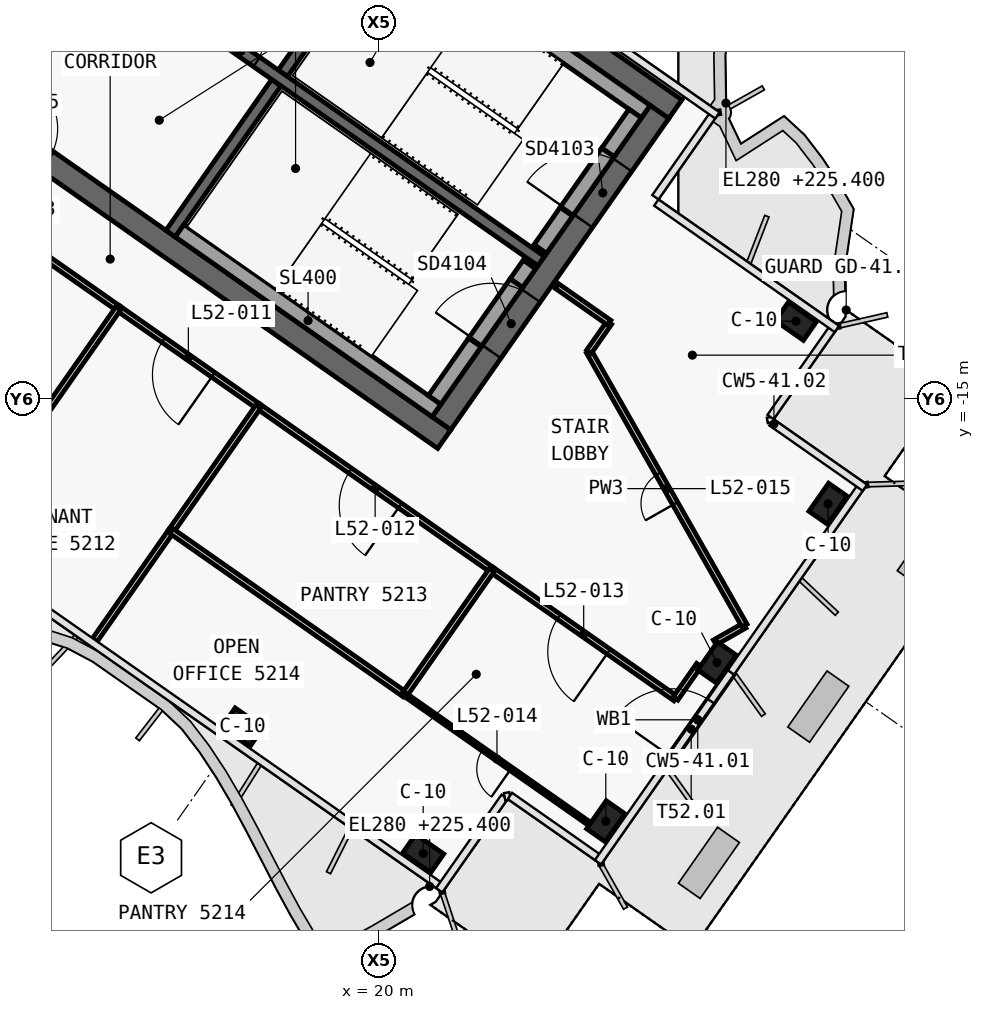
"""IFC4 building model, lengths in metres.
Left out: names, types, materials, properties, quantities, classifications, styles, units other than length and angle.
Written with IfcOpenShell. Run it as: python <this file> out.ifc"""

import sys

from ifc_helpers import new_model, si_unit, direction, frame, frame_2d, origin, origin_2d, place, context, subcontext, project, spatial, polyline, rectangle, outline, extrude, element, fill, save


model = new_model("IFC4")
c1 = context("Model", 3, precision=1e-05, world=origin(), true_north=direction((0.0, 1.0)))
c2 = subcontext(c1, "Body", "Model", "MODEL_VIEW")
j1 = project(units=[si_unit("LENGTHUNIT", "METRE"), si_unit("PLANEANGLEUNIT", "RADIAN")], contexts=[c1])
p1 = place(None, origin())
s1 = spatial("IfcSite", under=j1, at=p1, CompositionType="ELEMENT")
p2 = place(p1, origin())
s2 = spatial("IfcBuilding", under=s1, at=p2, CompositionType="ELEMENT")
p3 = place(p2, frame((0.0, 0.0, 225.4)))
s3 = spatial("IfcBuildingStorey", under=s2, at=p3, CompositionType="ELEMENT", Elevation=225.4)
p4 = place(p3, frame((0.028, 12.066, 0.0), z_axis=(0.0, 0.0, 1.0), x_axis=(0.819151382952, -0.573577380837, 0.0)))
e1 = element("IfcWall", 1, at=p4, inside=s3, PredefinedType="SHEAR", context=c2, shape_type="SweptSolid", body=[
    extrude(outline(polyline([(33.898, 0.3), (0.0, 0.3), (0.42, -0.3), (33.898, -0.3), (33.898, 0.3)])), origin(), (0.0, 0.0, 1.0), 3.9),
])
p5 = place(p3, frame((0.028, -0.874, 0.0), z_axis=(0.0, 0.0, 1.0), x_axis=(0.819150035022, -0.573579305871, 0.0)))
e2 = element("IfcWall", 2, at=p5, inside=s3, PredefinedType="SHEAR", context=c2, shape_type="SweptSolid", body=[
    extrude(outline(polyline([(26.476, 0.3), (0.0, 0.3), (0.42, -0.3), (26.476, -0.3), (26.476, 0.3)])), origin(), (0.0, 0.0, 1.0), 3.9),
])
p6 = place(p5, frame((6.576, 0.0, 0.0)))
e3 = element("IfcOpeningElement", 3, at=p6, cuts=e2, PredefinedType="OPENING", context=c2, shape_type="SweptSolid", body=[
    extrude(rectangle(XDim=1.5, YDim=2.1, at=frame_2d((0.75, 1.05))), frame((0.0, 0.31, 0.0), z_axis=(0.0, -1.0, 0.0), x_axis=(1.0, 0.0, 0.0)), (0.0, 0.0, 1.0), 0.62),
])
p7 = place(p5, frame((12.226, 0.0, 0.0)))
e4 = element("IfcOpeningElement", 4, at=p7, cuts=e2, PredefinedType="OPENING", context=c2, shape_type="SweptSolid", body=[
    extrude(rectangle(XDim=1.5, YDim=2.1, at=frame_2d((0.75, 1.05))), frame((0.0, 0.31, 0.0), z_axis=(0.0, -1.0, 0.0), x_axis=(1.0, 0.0, 0.0)), (0.0, 0.0, 1.0), 0.62),
])
p8 = place(p3, frame((21.642, -15.642, 0.0), z_axis=(0.0, 0.0, 1.0), x_axis=(0.573586866468, 0.819144740944, 0.0)))
e5 = element("IfcWall", 5, at=p8, inside=s3, PredefinedType="SHEAR", context=c2, shape_type="SweptSolid", body=[
    extrude(outline(polyline([(10.0, 0.3), (0.0, 0.3), (0.0, -0.3), (10.0, -0.3), (10.0, 0.3)])), origin(), (0.0, 0.0, 1.0), 3.9),
])
p9 = place(p8, frame((6.5, 0.0, 0.0)))
e6 = element("IfcOpeningElement", 6, at=p9, cuts=e5, PredefinedType="OPENING", context=c2, shape_type="SweptSolid", body=[
    extrude(rectangle(XDim=1.8, YDim=2.1, at=frame_2d((0.9, 1.05))), frame((0.0, 0.31, 0.0), z_axis=(0.0, -1.0, 0.0), x_axis=(1.0, 0.0, 0.0)), (0.0, 0.0, 1.0), 0.62),
])
p10 = place(p8, frame((2.3, 0.0, 0.0)))
e7 = element("IfcOpeningElement", 7, at=p10, cuts=e5, PredefinedType="OPENING", context=c2, shape_type="SweptSolid", body=[
    extrude(rectangle(XDim=1.8, YDim=2.1, at=frame_2d((0.9, 1.05))), frame((0.0, 0.31, 0.0), z_axis=(0.0, -1.0, 0.0), x_axis=(1.0, 0.0, 0.0)), (0.0, 0.0, 1.0), 0.62),
])
p11 = place(p3, frame((14.515, -10.652, 0.0), z_axis=(0.0, 0.0, 1.0), x_axis=(0.573560315113, 0.819163332265, 0.0)))
e8 = element("IfcWall", 8, at=p11, inside=s3, PredefinedType="SHEAR", context=c2, shape_type="SweptSolid", body=[
    extrude(outline(polyline([(0.0, 0.15), (0.0, -0.15), (4.85, -0.15), (4.85, 0.15), (0.0, 0.15)])), origin(), (0.0, 0.0, 1.0), 3.9),
])
p12 = place(p3, frame((17.469, -6.433, 0.0), z_axis=(0.0, 0.0, 1.0), x_axis=(0.573594092424, 0.81913968109, 0.0)))
e9 = element("IfcWall", 9, at=p12, inside=s3, PredefinedType="SHEAR", context=c2, shape_type="SweptSolid", body=[
    extrude(outline(polyline([(4.85, -0.15), (4.85, 0.15), (0.0, 0.15), (0.0, -0.15), (4.85, -0.15)])), origin(), (0.0, 0.0, 1.0), 3.9),
])
p13 = place(p3, frame((2.638, 3.768, 0.0), z_axis=(0.0, 0.0, 1.0), x_axis=(0.819155014212, -0.573572194837, 0.0)))
e10 = element("IfcWall", 10, at=p13, inside=s3, PredefinedType="SHEAR", context=c2, shape_type="SweptSolid", body=[
    extrude(outline(polyline([(0.0, 0.15), (0.0, -0.15), (26.4, -0.15), (26.4, 0.15), (0.0, 0.15)])), origin(), (0.0, 0.0, 1.0), 3.9),
])
p14 = place(p13, frame((9.637, 0.0, 0.0)))
e11 = element("IfcOpeningElement", 11, at=p14, cuts=e10, PredefinedType="OPENING", context=c2, shape_type="SweptSolid", body=[
    extrude(rectangle(XDim=1.2, YDim=2.1, at=frame_2d((0.6, 1.05))), frame((0.0, 0.16, 0.0), z_axis=(0.0, -1.0, 0.0), x_axis=(1.0, 0.0, 0.0)), (0.0, 0.0, 1.0), 0.32),
])
p15 = place(p13, frame((11.812, 0.0, 0.0)))
e12 = element("IfcOpeningElement", 12, at=p15, cuts=e10, PredefinedType="OPENING", context=c2, shape_type="SweptSolid", body=[
    extrude(rectangle(XDim=1.2, YDim=2.1, at=frame_2d((0.6, 1.05))), frame((0.0, 0.16, 0.0), z_axis=(0.0, -1.0, 0.0), x_axis=(1.0, 0.0, 0.0)), (0.0, 0.0, 1.0), 0.32),
])
p16 = place(p13, frame((13.988, 0.0, 0.0)))
e13 = element("IfcOpeningElement", 13, at=p16, cuts=e10, PredefinedType="OPENING", context=c2, shape_type="SweptSolid", body=[
    extrude(rectangle(XDim=1.2, YDim=2.1, at=frame_2d((0.6, 1.05))), frame((0.0, 0.16, 0.0), z_axis=(0.0, -1.0, 0.0), x_axis=(1.0, 0.0, 0.0)), (0.0, 0.0, 1.0), 0.32),
])
p17 = place(p13, frame((16.262, 0.0, 0.0)))
e14 = element("IfcOpeningElement", 14, at=p17, cuts=e10, PredefinedType="OPENING", context=c2, shape_type="SweptSolid", body=[
    extrude(rectangle(XDim=1.0, YDim=2.1, at=frame_2d((0.5, 1.05))), frame((0.0, 0.16, 0.0), z_axis=(0.0, -1.0, 0.0), x_axis=(1.0, 0.0, 0.0)), (0.0, 0.0, 1.0), 0.32),
])
for number, where, z_axis, x_axis in (
    (15, (16.41, -23.637, 0.0), (0.0, 0.0, 1.0), (0.819, -0.574, 0.0)),
    (16, (21.161, -26.964, 0.0), (0.0, 0.0, 1.0), (0.819, -0.574, 0.0)),
    (17, (30.969, -12.956, 0.0), (0.0, 0.0, 1.0), (0.819, -0.574, 0.0)),
    (18, (25.966, -26.117, 0.0), (0.0, 0.0, 1.0), (0.574, 0.819, 0.0)),
    (19, (28.891, -21.939, 0.0), (0.0, 0.0, 1.0), (0.574, 0.819, 0.0)),
    (20, (31.816, -17.761, 0.0), (0.0, 0.0, 1.0), (0.574, 0.819, 0.0)),
):
    element("IfcColumn", number, at=place(p3, frame(where, z_axis=z_axis, x_axis=x_axis)), inside=s3, PredefinedType="COLUMN", context=c2, shape_type="SweptSolid", body=[
        extrude(rectangle(XDim=0.9, YDim=0.6, at=origin_2d()), origin(), (0.0, 0.0, 1.0), 3.9),
    ])
p18 = place(p3, frame((20.259, -2.71, 0.0), z_axis=(0.0, 0.0, 1.0), x_axis=(0.81914849389, -0.573581506813, 0.0)))
e21 = element("IfcWall", 21, at=p18, inside=s3, PredefinedType="SOLIDWALL", context=c2, shape_type="SweptSolid", body=[
    extrude(rectangle(XDim=8.25, YDim=0.4, at=frame_2d((4.125, 0.0))), origin(), (0.0, 0.0, 1.0), 3.62),
])
p19 = place(p3, frame((24.244, -11.055, 0.0), z_axis=(0.0, 0.0, 1.0), x_axis=(0.573571582932, 0.819155442668, 0.0)))
e22 = element("IfcWall", 22, at=p19, inside=s3, PredefinedType="SOLIDWALL", context=c2, shape_type="SweptSolid", body=[
    extrude(rectangle(XDim=1.2, YDim=0.4, at=frame_2d((0.6, 0.0))), origin(), (0.0, 0.0, 1.0), 3.62),
])
p20 = place(p3, frame((26.022, -8.515, 0.0), z_axis=(0.0, 0.0, 1.0), x_axis=(0.573619628835, 0.819121798889, 0.0)))
e23 = element("IfcWall", 23, at=p20, inside=s3, PredefinedType="SOLIDWALL", context=c2, shape_type="SweptSolid", body=[
    extrude(rectangle(XDim=1.25, YDim=0.4, at=frame_2d((0.625, 0.0))), origin(), (0.0, 0.0, 1.0), 3.62),
])
p21 = place(p3, frame((24.932, -10.072, 2.15), z_axis=(0.0, 0.0, 1.0), x_axis=(0.573591692345, 0.819141361715, 0.0)))
e24 = element("IfcWall", 24, at=p21, inside=s3, PredefinedType="SOLIDWALL", context=c2, shape_type="SweptSolid", body=[
    extrude(rectangle(XDim=1.9, YDim=0.4, at=frame_2d((0.95, 0.0))), origin(), (0.0, 0.0, 1.0), 1.47),
])
p22 = place(p3, frame((14.753, -10.574, 0.0), z_axis=(0.0, 0.0, 1.0), x_axis=(0.819158229677, -0.573567602601, 0.0)))
e25 = element("IfcWall", 25, at=p22, inside=s3, PredefinedType="SOLIDWALL", context=c2, shape_type="SweptSolid", body=[
    extrude(rectangle(XDim=8.25, YDim=0.4, at=frame_2d((4.125, 0.0))), origin(), (0.0, 0.0, 1.0), 3.62),
])
p23 = place(p3, frame((21.462, -15.028, 0.0), z_axis=(0.0, 0.0, 1.0), x_axis=(0.573559770908, 0.819163713305, 0.0)))
e26 = element("IfcWall", 26, at=p23, inside=s3, PredefinedType="SOLIDWALL", context=c2, shape_type="SweptSolid", body=[
    extrude(rectangle(XDim=1.85, YDim=0.4, at=frame_2d((0.925, 0.0))), origin(), (0.0, 0.0, 1.0), 3.62),
])
p24 = place(p3, frame((23.613, -11.956, 0.0), z_axis=(0.0, 0.0, 1.0), x_axis=(0.573435029941, 0.819251039936, 0.0)))
e27 = element("IfcWall", 27, at=p24, inside=s3, PredefinedType="SOLIDWALL", context=c2, shape_type="SweptSolid", body=[
    extrude(rectangle(XDim=0.6, YDim=0.4, at=frame_2d((0.3, 0.0))), origin(), (0.0, 0.0, 1.0), 3.62),
])
p25 = place(p3, frame((22.523, -13.512, 2.15), z_axis=(0.0, 0.0, 1.0), x_axis=(0.573591692345, 0.819141361715, 0.0)))
e28 = element("IfcWall", 28, at=p25, inside=s3, PredefinedType="SOLIDWALL", context=c2, shape_type="SweptSolid", body=[
    extrude(rectangle(XDim=1.9, YDim=0.4, at=frame_2d((0.95, 0.0))), origin(), (0.0, 0.0, 1.0), 1.47),
])
p26 = place(p3, frame((27.528, -24.671, 0.0), z_axis=(0.0, 0.0, 1.0), x_axis=(0.57360481557, 0.819132172213, 0.0)))
e29 = element("IfcWall", 29, at=p26, inside=s3, PredefinedType="SOLIDWALL", context=c2, shape_type="SweptSolid", body=[
    extrude(rectangle(XDim=2.99, YDim=0.2, at=frame_2d((1.495, 0.0))), origin(), (0.0, 0.0, 1.0), 3.62),
])
p27 = place(p26, frame((0.295, 0.0, 0.0)))
e30 = element("IfcOpeningElement", 30, at=p27, cuts=e29, PredefinedType="OPENING", context=c2, shape_type="SweptSolid", body=[
    extrude(rectangle(XDim=1.8, YDim=2.4, at=frame_2d((0.9, 1.2))), frame((0.0, 0.11, 0.0), z_axis=(0.0, -1.0, 0.0), x_axis=(1.0, 0.0, 0.0)), (0.0, 0.0, 1.0), 0.22),
])
p28 = place(p3, frame((13.14, -12.619, 0.0), z_axis=(0.0, 0.0, 1.0), x_axis=(-0.81915291695, 0.57357519006, 0.0)))
e31 = element("IfcWall", 31, at=p28, inside=s3, PredefinedType="PARTITIONING", context=c2, shape_type="SweptSolid", body=[
    extrude(rectangle(XDim=9.002, YDim=0.15, at=frame_2d((4.501, 0.0))), origin(), (0.0, 0.0, 1.0), 3.05),
])
p29 = place(p28, frame((3.701, 0.0, 0.0)))
e32 = element("IfcOpeningElement", 32, at=p29, cuts=e31, PredefinedType="OPENING", context=c2, shape_type="SweptSolid", body=[
    extrude(rectangle(XDim=1.6, YDim=2.1, at=frame_2d((0.8, 1.05))), frame((0.0, 0.085, 0.0), z_axis=(0.0, -1.0, 0.0), x_axis=(1.0, 0.0, 0.0)), (0.0, 0.0, 1.0), 0.17),
])
p30 = place(p3, frame((16.826, -15.2, 0.0), z_axis=(0.0, 0.0, 1.0), x_axis=(-0.819147870025, 0.573582397772, 0.0)))
e33 = element("IfcWall", 33, at=p30, inside=s3, PredefinedType="PARTITIONING", context=c2, shape_type="SweptSolid", body=[
    extrude(rectangle(XDim=4.504, YDim=0.15, at=frame_2d((2.252, 0.0))), origin(), (0.0, 0.0, 1.0), 3.05),
])
p31 = place(p30, frame((1.452, 0.0, 0.0)))
e34 = element("IfcOpeningElement", 34, at=p31, cuts=e33, PredefinedType="OPENING", context=c2, shape_type="SweptSolid", body=[
    extrude(rectangle(XDim=1.6, YDim=2.1, at=frame_2d((0.8, 1.05))), frame((0.0, 0.085, 0.0), z_axis=(0.0, -1.0, 0.0), x_axis=(1.0, 0.0, 0.0)), (0.0, 0.0, 1.0), 0.17),
])
p32 = place(p3, frame((22.97, -19.502, 0.0), z_axis=(0.0, 0.0, 1.0), x_axis=(-0.819149375276, 0.573580248078, 0.0)))
e35 = element("IfcWall", 35, at=p32, inside=s3, PredefinedType="PARTITIONING", context=c2, shape_type="SweptSolid", body=[
    extrude(rectangle(XDim=7.504, YDim=0.15, at=frame_2d((3.752, 0.0))), origin(), (0.0, 0.0, 1.0), 3.05),
])
p33 = place(p32, frame((2.952, 0.0, 0.0)))
e36 = element("IfcOpeningElement", 36, at=p33, cuts=e35, PredefinedType="OPENING", context=c2, shape_type="SweptSolid", body=[
    extrude(rectangle(XDim=1.6, YDim=2.1, at=frame_2d((0.8, 1.05))), frame((0.0, 0.085, 0.0), z_axis=(0.0, -1.0, 0.0), x_axis=(1.0, 0.0, 0.0)), (0.0, 0.0, 1.0), 0.17),
])
p34 = place(p3, frame((27.802, -22.885, 0.0), z_axis=(0.0, 0.0, 1.0), x_axis=(-0.819156123335, 0.573570610825, 0.0)))
e37 = element("IfcWall", 37, at=p34, inside=s3, PredefinedType="PARTITIONING", context=c2, shape_type="SweptSolid", body=[
    extrude(rectangle(XDim=5.902, YDim=0.15, at=frame_2d((2.951, 0.0))), origin(), (0.0, 0.0, 1.0), 3.05),
])
p35 = place(p34, frame((2.151, 0.0, 0.0)))
e38 = element("IfcOpeningElement", 38, at=p35, cuts=e37, PredefinedType="OPENING", context=c2, shape_type="SweptSolid", body=[
    extrude(rectangle(XDim=1.6, YDim=2.1, at=frame_2d((0.8, 1.05))), frame((0.0, 0.085, 0.0), z_axis=(0.0, -1.0, 0.0), x_axis=(1.0, 0.0, 0.0)), (0.0, 0.0, 1.0), 0.17),
])
p36 = place(p3, frame((28.418, -22.004, 0.0), z_axis=(0.0, 0.0, 1.0), x_axis=(-0.573629982879, -0.819114547998, 0.0)))
e39 = element("IfcWall", 39, at=p36, inside=s3, PredefinedType="PARTITIONING", context=c2, shape_type="SweptSolid", body=[
    extrude(rectangle(XDim=1.075, YDim=0.15, at=frame_2d((0.538, 0.0))), origin(), (0.0, 0.0, 1.0), 3.62),
])
p37 = place(p3, frame((28.834, -21.411, 0.0), z_axis=(0.0, 0.0, 1.0), x_axis=(0.869525386045, 0.493888249529, 0.0)))
e40 = element("IfcWall", 40, at=p37, inside=s3, PredefinedType="PARTITIONING", context=c2, shape_type="SweptSolid", body=[
    extrude(rectangle(XDim=0.9, YDim=0.15, at=frame_2d((0.45, 0.0))), origin(), (0.0, 0.0, 1.0), 3.0),
])
p38 = place(p3, frame((29.617, -20.966, 0.0), z_axis=(0.0, 0.0, 1.0), x_axis=(-0.493827705015, 0.86955977239, 0.0)))
e41 = element("IfcWall", 41, at=p38, inside=s3, PredefinedType="PARTITIONING", context=c2, shape_type="SweptSolid", body=[
    extrude(rectangle(XDim=8.288, YDim=0.15, at=frame_2d((4.144, 0.0))), origin(), (0.0, 0.0, 1.0), 3.0),
])
p39 = place(p38, frame((3.694, 0.0, 0.0)))
e42 = element("IfcOpeningElement", 42, at=p39, cuts=e41, PredefinedType="OPENING", context=c2, shape_type="SweptSolid", body=[
    extrude(rectangle(XDim=0.9, YDim=2.1, at=frame_2d((0.45, 1.05))), frame((0.0, 0.085, 0.0), z_axis=(0.0, -1.0, 0.0), x_axis=(1.0, 0.0, 0.0)), (0.0, 0.0, 1.0), 0.17),
])
p40 = place(p3, frame((25.524, -13.759, 0.0), z_axis=(0.0, 0.0, 1.0), x_axis=(0.573497542524, 0.81920728068, 0.0)))
e43 = element("IfcWall", 43, at=p40, inside=s3, PredefinedType="PARTITIONING", context=c2, shape_type="SweptSolid", body=[
    extrude(rectangle(XDim=0.931, YDim=0.15, at=frame_2d((0.465, 0.0))), origin(), (0.0, 0.0, 1.0), 3.62),
])
p41 = place(p3, frame((26.058, -12.997, 0.0), z_axis=(0.0, 0.0, 1.0), x_axis=(-0.819109000826, 0.573637903879, 0.0)))
e44 = element("IfcWall", 44, at=p41, inside=s3, PredefinedType="PARTITIONING", context=c2, shape_type="SweptSolid", body=[
    extrude(rectangle(XDim=1.68, YDim=0.15, at=frame_2d((0.84, 0.0))), origin(), (0.0, 0.0, 1.0), 3.62),
])
p42 = place(p3, frame((13.139, -12.618, 0.0), z_axis=(0.0, 0.0, 1.0), x_axis=(-0.573556557423, -0.819165963305, 0.0)))
e45 = element("IfcWall", 45, at=p42, inside=s3, PredefinedType="PARTITIONING", context=c2, shape_type="SweptSolid", body=[
    extrude(rectangle(XDim=4.0, YDim=0.15, at=frame_2d((2.0, 0.0))), origin(), (0.0, 0.0, 1.0), 3.05),
])
p43 = place(p3, frame((16.825, -15.199, 0.0), z_axis=(0.0, 0.0, 1.0), x_axis=(-0.573589265117, -0.819143061341, 0.0)))
e46 = element("IfcWall", 46, at=p43, inside=s3, PredefinedType="PARTITIONING", context=c2, shape_type="SweptSolid", body=[
    extrude(rectangle(XDim=4.002, YDim=0.15, at=frame_2d((2.001, 0.0))), origin(), (0.0, 0.0, 1.0), 3.62),
])
p44 = place(p3, frame((14.531, -18.475, 0.0), z_axis=(0.0, 0.0, 1.0), x_axis=(-0.573560622794, -0.819163116834, 0.0)))
e47 = element("IfcWall", 47, at=p44, inside=s3, PredefinedType="PARTITIONING", context=c2, shape_type="SweptSolid", body=[
    extrude(rectangle(XDim=3.501, YDim=0.15, at=frame_2d((1.75, 0.0))), origin(), (0.0, 0.0, 1.0), 3.0),
])
p45 = place(p3, frame((20.674, -22.778, 0.0), z_axis=(0.0, 0.0, 1.0), x_axis=(-0.819147803225, 0.57358249317, 0.0)))
e48 = element("IfcWall", 48, at=p45, inside=s3, PredefinedType="PARTITIONING", context=c2, shape_type="SweptSolid", body=[
    extrude(rectangle(XDim=7.5, YDim=0.15, at=frame_2d((3.75, 0.0))), origin(), (0.0, 0.0, 1.0), 3.05),
])
p46 = place(p3, frame((22.969, -19.501, 0.0), z_axis=(0.0, 0.0, 1.0), x_axis=(-0.573556557423, -0.819165963305, 0.0)))
e49 = element("IfcWall", 49, at=p46, inside=s3, PredefinedType="PARTITIONING", context=c2, shape_type="SweptSolid", body=[
    extrude(rectangle(XDim=4.0, YDim=0.15, at=frame_2d((2.0, 0.0))), origin(), (0.0, 0.0, 1.0), 3.62),
])
p47 = place(p3, frame((25.531, -26.18, 0.0), z_axis=(0.0, 0.0, 1.0), x_axis=(-0.819152612748, 0.573575624507, 0.0)))
e50 = element("IfcWall", 50, at=p47, inside=s3, PredefinedType="PARTITIONING", context=c2, shape_type="SweptSolid", body=[
    extrude(rectangle(XDim=5.93, YDim=0.1, at=frame_2d((2.965, 0.0))), origin(), (0.0, 0.0, 1.0), 3.0),
])
p48 = place(p47, frame((2.515, 0.0, 0.0)))
e51 = element("IfcOpeningElement", 51, at=p48, cuts=e50, PredefinedType="OPENING", context=c2, shape_type="SweptSolid", body=[
    extrude(rectangle(XDim=0.9, YDim=2.1, at=frame_2d((0.45, 1.05))), frame((0.0, 0.06, 0.0), z_axis=(0.0, -1.0, 0.0), x_axis=(1.0, 0.0, 0.0)), (0.0, 0.0, 1.0), 0.12),
])
p49 = place(p17, origin())
e52 = element("IfcDoor", 52, at=p49, inside=s3, OperationType="SINGLE_SWING_RIGHT", PredefinedType="DOOR", context=c2, shape_type="SweptSolid", body=[
    extrude(rectangle(XDim=1.0, YDim=2.1, at=frame_2d((0.5, 1.05))), frame((0.0, 0.025, 0.0), z_axis=(0.0, -1.0, 0.0), x_axis=(1.0, 0.0, 0.0)), (0.0, 0.0, 1.0), 0.05),
])
fill(e14, e52)
p50 = place(p9, origin())
e53 = element("IfcDoor", 53, at=p50, inside=s3, OperationType="DOUBLE_DOOR_SINGLE_SWING", PredefinedType="DOOR", context=c2, shape_type="SweptSolid", body=[
    extrude(rectangle(XDim=1.8, YDim=2.1, at=frame_2d((0.9, 1.05))), frame((0.0, 0.025, 0.0), z_axis=(0.0, -1.0, 0.0), x_axis=(1.0, 0.0, 0.0)), (0.0, 0.0, 1.0), 0.05),
])
fill(e6, e53)
p51 = place(p10, origin())
e54 = element("IfcDoor", 54, at=p51, inside=s3, OperationType="DOUBLE_DOOR_SINGLE_SWING", PredefinedType="DOOR", context=c2, shape_type="SweptSolid", body=[
    extrude(rectangle(XDim=1.8, YDim=2.1, at=frame_2d((0.9, 1.05))), frame((0.0, 0.025, 0.0), z_axis=(0.0, -1.0, 0.0), x_axis=(1.0, 0.0, 0.0)), (0.0, 0.0, 1.0), 0.05),
])
fill(e7, e54)
p52 = place(p27, origin())
e55 = element("IfcDoor", 55, at=p52, inside=s3, OperationType="DOUBLE_DOOR_DOUBLE_SWING", PredefinedType="DOOR", context=c2, shape_type="SweptSolid", body=[
    extrude(rectangle(XDim=1.8, YDim=2.4, at=frame_2d((0.9, 1.2))), frame((0.0, 0.025, 0.0), z_axis=(0.0, -1.0, 0.0), x_axis=(1.0, 0.0, 0.0)), (0.0, 0.0, 1.0), 0.05),
])
fill(e30, e55)
p53 = place(p31, origin())
e56 = element("IfcDoor", 56, at=p53, inside=s3, OperationType="DOUBLE_DOOR_SINGLE_SWING", PredefinedType="DOOR", context=c2, shape_type="SweptSolid", body=[
    extrude(rectangle(XDim=1.6, YDim=2.1, at=frame_2d((0.8, 1.05))), frame((0.0, 0.025, 0.0), z_axis=(0.0, -1.0, 0.0), x_axis=(1.0, 0.0, 0.0)), (0.0, 0.0, 1.0), 0.05),
])
fill(e34, e56)
p54 = place(p33, origin())
e57 = element("IfcDoor", 57, at=p54, inside=s3, OperationType="DOUBLE_DOOR_SINGLE_SWING", PredefinedType="DOOR", context=c2, shape_type="SweptSolid", body=[
    extrude(rectangle(XDim=1.6, YDim=2.1, at=frame_2d((0.8, 1.05))), frame((0.0, 0.025, 0.0), z_axis=(0.0, -1.0, 0.0), x_axis=(1.0, 0.0, 0.0)), (0.0, 0.0, 1.0), 0.05),
])
fill(e36, e57)
p55 = place(p35, origin())
e58 = element("IfcDoor", 58, at=p55, inside=s3, OperationType="DOUBLE_DOOR_SINGLE_SWING", PredefinedType="DOOR", context=c2, shape_type="SweptSolid", body=[
    extrude(rectangle(XDim=1.6, YDim=2.1, at=frame_2d((0.8, 1.05))), frame((0.0, 0.025, 0.0), z_axis=(0.0, -1.0, 0.0), x_axis=(1.0, 0.0, 0.0)), (0.0, 0.0, 1.0), 0.05),
])
fill(e38, e58)
p56 = place(p48, origin())
e59 = element("IfcDoor", 59, at=p56, inside=s3, OperationType="SINGLE_SWING_RIGHT", PredefinedType="DOOR", context=c2, shape_type="SweptSolid", body=[
    extrude(rectangle(XDim=0.9, YDim=2.1, at=frame_2d((0.45, 1.05))), frame((0.0, 0.025, 0.0), z_axis=(0.0, -1.0, 0.0), x_axis=(1.0, 0.0, 0.0)), (0.0, 0.0, 1.0), 0.05),
])
fill(e51, e59)
p57 = place(p39, origin())
e60 = element("IfcDoor", 60, at=p57, inside=s3, OperationType="SINGLE_SWING_RIGHT", PredefinedType="DOOR", context=c2, shape_type="SweptSolid", body=[
    extrude(rectangle(XDim=0.9, YDim=2.1, at=frame_2d((0.45, 1.05))), frame((0.0, 0.025, 0.0), z_axis=(0.0, -1.0, 0.0), x_axis=(1.0, 0.0, 0.0)), (0.0, 0.0, 1.0), 0.05),
])
fill(e42, e60)
save(model, sys.argv[1])
